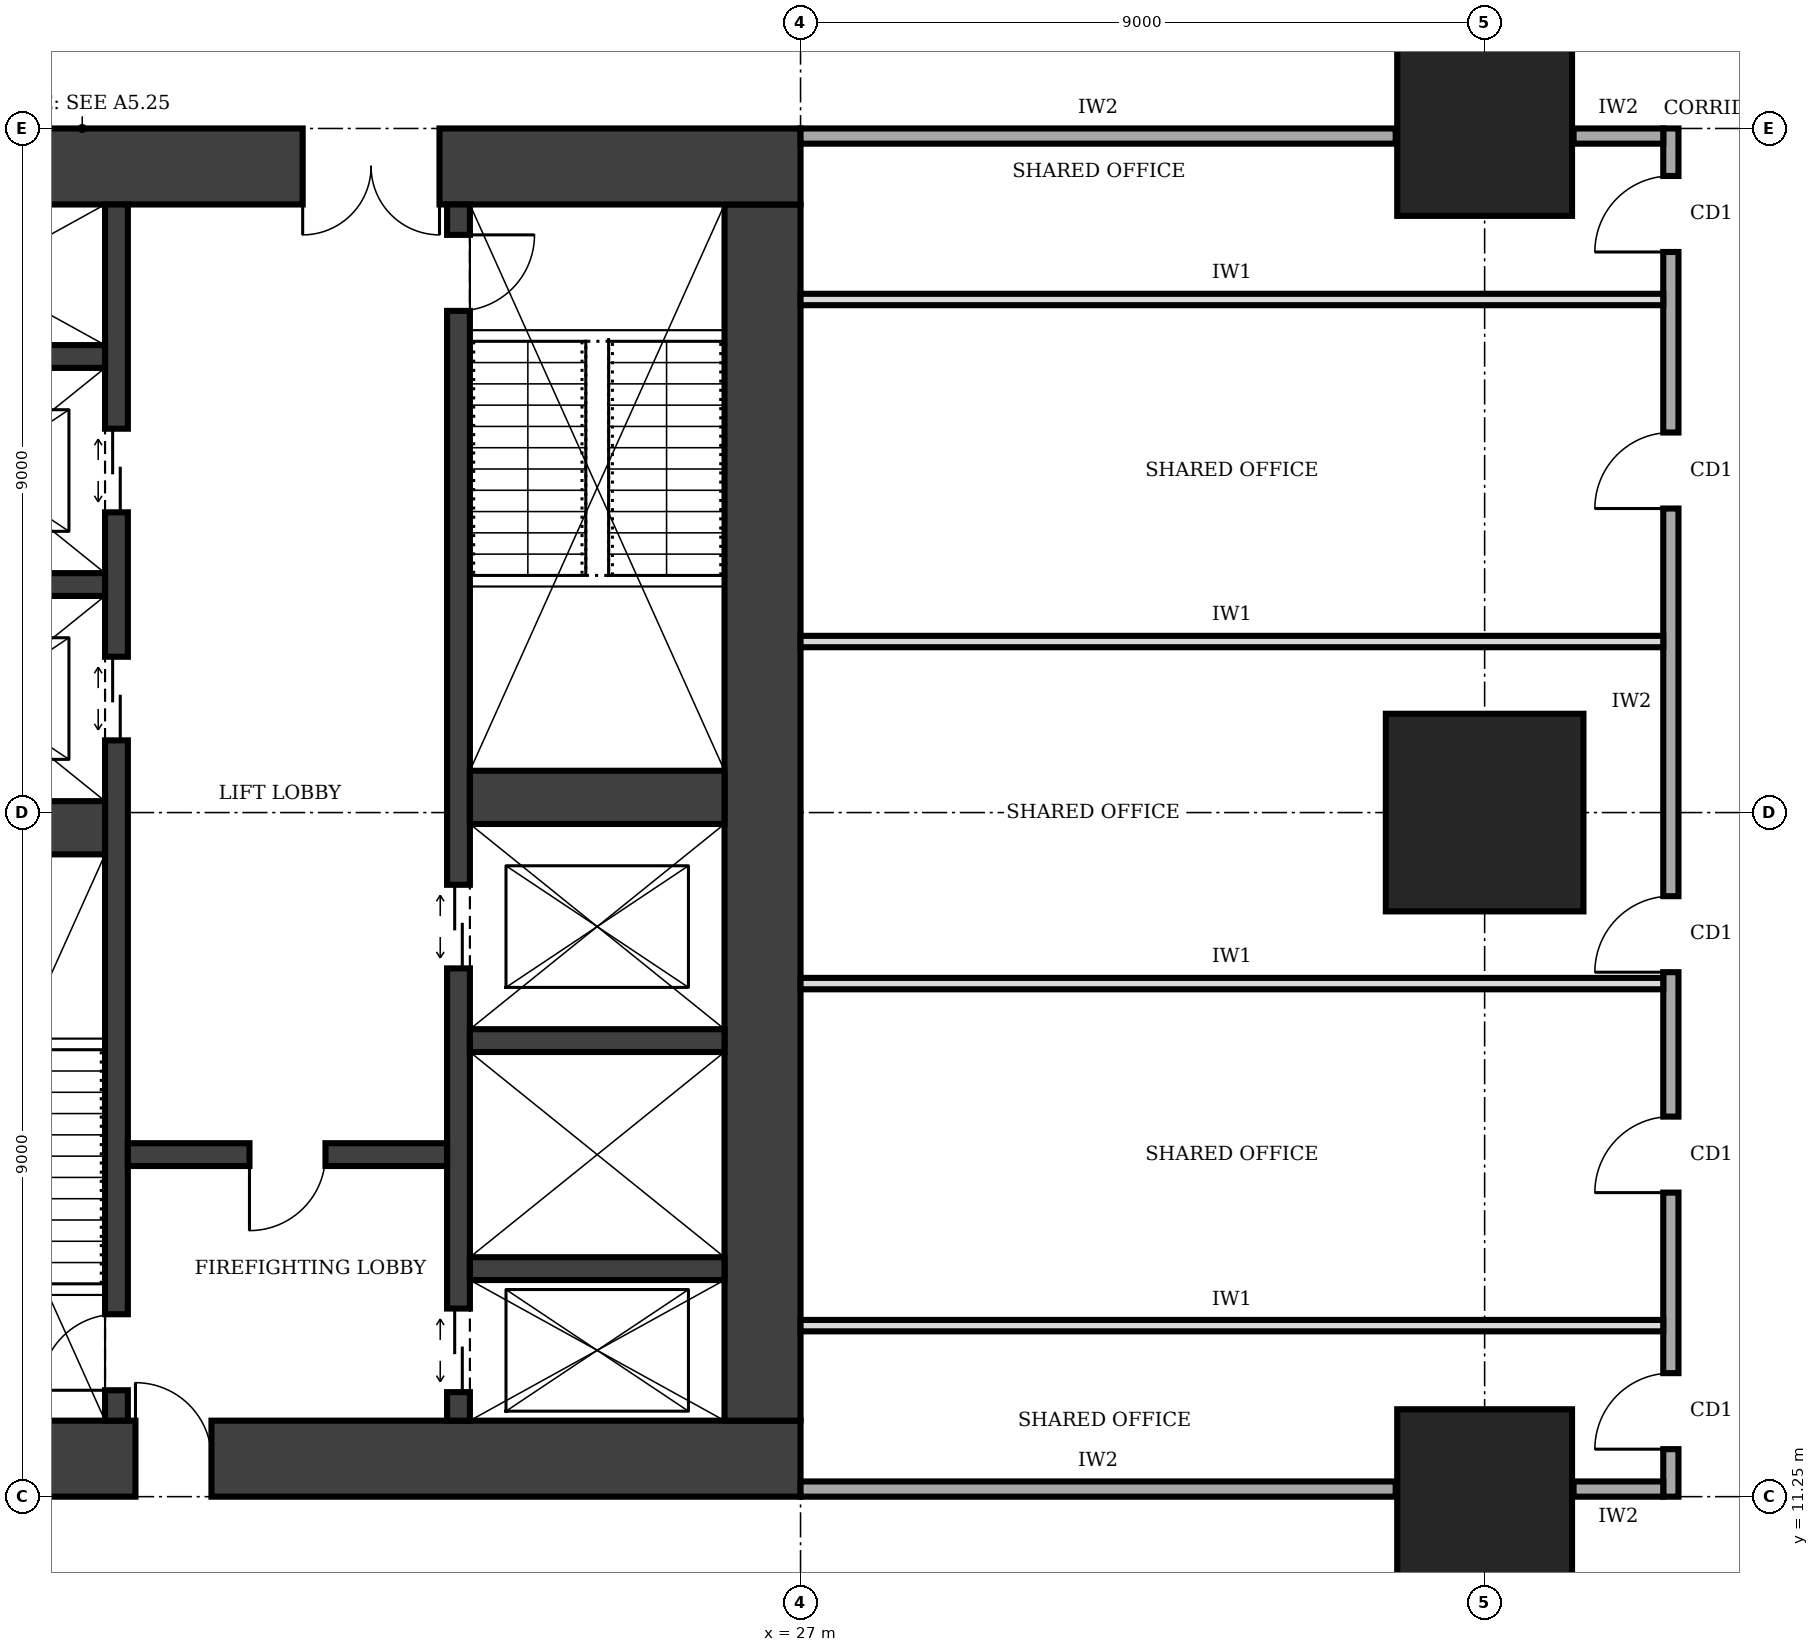
"""IFC4 building model, lengths in metres.
Left out: names, types, materials, properties, quantities, classifications, styles, units other than length and angle.
Written with IfcOpenShell. Run it as: python <this file> out.ifc"""

import sys

from ifc_helpers import new_model, si_unit, direction, frame, frame_2d, origin, origin_2d, place, context, subcontext, project, spatial, rectangle, extrude, element, fill, save


model = new_model("IFC4")
c1 = context("Model", 3, precision=1e-05, world=origin(), true_north=direction((0.0, 1.0)))
c2 = subcontext(c1, "Body", "Model", "MODEL_VIEW")
j1 = project(units=[si_unit("LENGTHUNIT", "METRE"), si_unit("PLANEANGLEUNIT", "RADIAN")], contexts=[c1])
p1 = place(None, origin())
s1 = spatial("IfcSite", under=j1, at=p1, CompositionType="ELEMENT")
p2 = place(p1, origin())
s2 = spatial("IfcBuilding", under=s1, at=p2, CompositionType="ELEMENT")
p3 = place(p2, frame((0.0, 0.0, 85.0)))
s3 = spatial("IfcBuildingStorey", under=s2, at=p3, CompositionType="ELEMENT", Elevation=85.0)
p4 = place(p3, frame((13.5, 11.75, 0.0), z_axis=(0.0, 0.0, 1.0), x_axis=(1.0, 0.0, 0.0)))
e1 = element("IfcWall", 1, at=p4, inside=s3, PredefinedType="SHEAR", context=c2, shape_type="SweptSolid", body=[
    extrude(rectangle(XDim=13.5, YDim=1.0, at=frame_2d((6.75, 0.0))), origin(), (0.0, 0.0, 1.0), 4.0),
])
p5 = place(p4, frame((4.75, 0.0, 0.0)))
e2 = element("IfcOpeningElement", 2, at=p5, cuts=e1, PredefinedType="OPENING", context=c2, shape_type="SweptSolid", body=[
    extrude(rectangle(XDim=1.0, YDim=2.1, at=frame_2d((0.5, 1.05))), frame((0.0, 0.51, 0.0), z_axis=(0.0, -1.0, 0.0), x_axis=(1.0, 0.0, 0.0)), (0.0, 0.0, 1.0), 1.02),
])
p6 = place(p3, frame((26.5, 12.25, 0.0), z_axis=(0.0, 0.0, 1.0), x_axis=(0.0, 1.0, 0.0)))
e3 = element("IfcWall", 3, at=p6, inside=s3, PredefinedType="SHEAR", context=c2, shape_type="SweptSolid", body=[
    extrude(rectangle(XDim=16.0, YDim=1.0, at=frame_2d((8.0, 0.0))), origin(), (0.0, 0.0, 1.0), 4.0),
])
p7 = place(p3, frame((27.0, 28.75, 0.0), z_axis=(0.0, 0.0, 1.0), x_axis=(-1.0, 0.0, 0.0)))
e4 = element("IfcWall", 4, at=p7, inside=s3, PredefinedType="SHEAR", context=c2, shape_type="SweptSolid", body=[
    extrude(rectangle(XDim=13.5, YDim=1.0, at=frame_2d((6.75, 0.0))), origin(), (0.0, 0.0, 1.0), 4.0),
])
p8 = place(p7, frame((4.75, 0.0, 0.0)))
e5 = element("IfcOpeningElement", 5, at=p8, cuts=e4, PredefinedType="OPENING", context=c2, shape_type="SweptSolid", body=[
    extrude(rectangle(XDim=1.8, YDim=2.1, at=frame_2d((0.9, 1.05))), frame((0.0, 0.51, 0.0), z_axis=(0.0, -1.0, 0.0), x_axis=(1.0, 0.0, 0.0)), (0.0, 0.0, 1.0), 1.02),
])
p9 = place(p3, frame((18.0, 12.25, 0.0), z_axis=(0.0, 0.0, 1.0), x_axis=(0.0, 1.0, 0.0)))
e6 = element("IfcWall", 6, at=p9, inside=s3, PredefinedType="SHEAR", context=c2, shape_type="SweptSolid", body=[
    extrude(rectangle(XDim=16.0, YDim=0.3, at=frame_2d((8.0, 0.0))), origin(), (0.0, 0.0, 1.0), 4.0),
])
p10 = place(p9, frame((0.4, 0.0, 0.0)))
e7 = element("IfcOpeningElement", 7, at=p10, cuts=e6, PredefinedType="OPENING", context=c2, shape_type="SweptSolid", body=[
    extrude(rectangle(XDim=1.0, YDim=2.1, at=frame_2d((0.5, 1.05))), frame((0.0, 0.16, 0.0), z_axis=(0.0, -1.0, 0.0), x_axis=(1.0, 0.0, 0.0)), (0.0, 0.0, 1.0), 0.32),
])
p11 = place(p9, frame((8.95, 0.0, 0.0)))
e8 = element("IfcOpeningElement", 8, at=p11, cuts=e6, PredefinedType="OPENING", context=c2, shape_type="SweptSolid", body=[
    extrude(rectangle(XDim=1.1, YDim=2.1, at=frame_2d((0.55, 1.05))), frame((0.0, 0.16, 0.0), z_axis=(0.0, -1.0, 0.0), x_axis=(1.0, 0.0, 0.0)), (0.0, 0.0, 1.0), 0.32),
])
p12 = place(p9, frame((11.95, 0.0, 0.0)))
e9 = element("IfcOpeningElement", 9, at=p12, cuts=e6, PredefinedType="OPENING", context=c2, shape_type="SweptSolid", body=[
    extrude(rectangle(XDim=1.1, YDim=2.1, at=frame_2d((0.55, 1.05))), frame((0.0, 0.16, 0.0), z_axis=(0.0, -1.0, 0.0), x_axis=(1.0, 0.0, 0.0)), (0.0, 0.0, 1.0), 0.32),
])
p13 = place(p3, frame((22.5, 12.25, 0.0), z_axis=(0.0, 0.0, 1.0), x_axis=(0.0, 1.0, 0.0)))
e10 = element("IfcWall", 10, at=p13, inside=s3, PredefinedType="SHEAR", context=c2, shape_type="SweptSolid", body=[
    extrude(rectangle(XDim=16.0, YDim=0.3, at=frame_2d((8.0, 0.0))), origin(), (0.0, 0.0, 1.0), 4.0),
])
p14 = place(p13, frame((14.6, 0.0, 0.0)))
e11 = element("IfcOpeningElement", 11, at=p14, cuts=e10, PredefinedType="OPENING", context=c2, shape_type="SweptSolid", body=[
    extrude(rectangle(XDim=1.0, YDim=2.1, at=frame_2d((0.5, 1.05))), frame((0.0, 0.16, 0.0), z_axis=(0.0, -1.0, 0.0), x_axis=(1.0, 0.0, 0.0)), (0.0, 0.0, 1.0), 0.32),
])
p15 = place(p13, frame((0.375, 0.0, 0.0)))
e12 = element("IfcOpeningElement", 12, at=p15, cuts=e10, PredefinedType="OPENING", context=c2, shape_type="SweptSolid", body=[
    extrude(rectangle(XDim=1.1, YDim=2.1, at=frame_2d((0.55, 1.05))), frame((0.0, 0.16, 0.0), z_axis=(0.0, -1.0, 0.0), x_axis=(1.0, 0.0, 0.0)), (0.0, 0.0, 1.0), 0.32),
])
p16 = place(p13, frame((5.95, 0.0, 0.0)))
e13 = element("IfcOpeningElement", 13, at=p16, cuts=e10, PredefinedType="OPENING", context=c2, shape_type="SweptSolid", body=[
    extrude(rectangle(XDim=1.1, YDim=2.1, at=frame_2d((0.55, 1.05))), frame((0.0, 0.16, 0.0), z_axis=(0.0, -1.0, 0.0), x_axis=(1.0, 0.0, 0.0)), (0.0, 0.0, 1.0), 0.32),
])
p17 = place(p3, frame((14.5, 20.05, 0.0), z_axis=(0.0, 0.0, 1.0), x_axis=(1.0, 0.0, 0.0)))
e14 = element("IfcWall", 14, at=p17, inside=s3, PredefinedType="SHEAR", context=c2, shape_type="SweptSolid", body=[
    extrude(rectangle(XDim=3.35, YDim=0.7, at=frame_2d((1.675, 0.0))), origin(), (0.0, 0.0, 1.0), 4.0),
])
p18 = place(p3, frame((18.15, 15.75, 0.0), z_axis=(0.0, 0.0, 1.0), x_axis=(1.0, 0.0, 0.0)))
e15 = element("IfcWall", 15, at=p18, inside=s3, PredefinedType="SHEAR", context=c2, shape_type="SweptSolid", body=[
    extrude(rectangle(XDim=4.2, YDim=0.3, at=frame_2d((2.1, 0.0))), origin(), (0.0, 0.0, 1.0), 4.0),
])
p19 = place(p18, frame((1.6, 0.0, 0.0)))
e16 = element("IfcOpeningElement", 16, at=p19, cuts=e15, PredefinedType="OPENING", context=c2, shape_type="SweptSolid", body=[
    extrude(rectangle(XDim=1.0, YDim=2.1, at=frame_2d((0.5, 1.05))), frame((0.0, 0.16, 0.0), z_axis=(0.0, -1.0, 0.0), x_axis=(1.0, 0.0, 0.0)), (0.0, 0.0, 1.0), 0.32),
])
for number, where, z_axis, x_axis in (
    (17, (22.65, 14.25, 0.0), (0.0, 0.0, 1.0), (1.0, 0.0, 0.0)),
    (18, (22.65, 17.25, 0.0), (0.0, 0.0, 1.0), (1.0, 0.0, 0.0)),
):
    element("IfcWall", number, at=place(p3, frame(where, z_axis=z_axis, x_axis=x_axis)), inside=s3, PredefinedType="SHEAR", context=c2, shape_type="SweptSolid", body=[
        extrude(rectangle(XDim=3.35, YDim=0.3, at=frame_2d((1.675, 0.0))), origin(), (0.0, 0.0, 1.0), 4.0),
    ])
p20 = place(p3, frame((22.65, 20.45, 0.0), z_axis=(0.0, 0.0, 1.0), x_axis=(1.0, 0.0, 0.0)))
e19 = element("IfcWall", 19, at=p20, inside=s3, PredefinedType="SHEAR", context=c2, shape_type="SweptSolid", body=[
    extrude(rectangle(XDim=3.35, YDim=0.7, at=frame_2d((1.675, 0.0))), origin(), (0.0, 0.0, 1.0), 4.0),
])
for number, where, z_axis, x_axis in (
    (20, (14.5, 23.25, 0.0), (0.0, 0.0, 1.0), (1.0, 0.0, 0.0)),
    (21, (14.5, 26.25, 0.0), (0.0, 0.0, 1.0), (1.0, 0.0, 0.0)),
):
    element("IfcWall", number, at=place(p3, frame(where, z_axis=z_axis, x_axis=x_axis)), inside=s3, PredefinedType="SHEAR", context=c2, shape_type="SweptSolid", body=[
        extrude(rectangle(XDim=3.35, YDim=0.3, at=frame_2d((1.675, 0.0))), origin(), (0.0, 0.0, 1.0), 4.0),
    ])
p21 = place(p3, frame((36.0, 11.25, 0.0), z_axis=(0.0, 0.0, 1.0), x_axis=(1.0, 0.0, 0.0)))
e22 = element("IfcColumn", 22, at=p21, inside=s3, PredefinedType="COLUMN", context=c2, shape_type="SweptSolid", body=[
    extrude(rectangle(XDim=2.3, YDim=2.3, at=origin_2d()), origin(), (0.0, 0.0, 1.0), 4.0),
])
p22 = place(p3, frame((36.0, 20.25, 0.0), z_axis=(0.0, 0.0, 1.0), x_axis=(1.0, 0.0, 0.0)))
e23 = element("IfcColumn", 23, at=p22, inside=s3, PredefinedType="COLUMN", context=c2, shape_type="SweptSolid", body=[
    extrude(rectangle(XDim=2.6, YDim=2.6, at=origin_2d()), origin(), (0.0, 0.0, 1.0), 4.0),
])
p23 = place(p3, frame((36.0, 29.25, 0.0), z_axis=(0.0, 0.0, 1.0), x_axis=(1.0, 0.0, 0.0)))
e24 = element("IfcColumn", 24, at=p23, inside=s3, PredefinedType="COLUMN", context=c2, shape_type="SweptSolid", body=[
    extrude(rectangle(XDim=2.3, YDim=2.3, at=origin_2d()), origin(), (0.0, 0.0, 1.0), 4.0),
])
p24 = place(p3, frame((38.45, 11.25, 0.0), z_axis=(0.0, 0.0, 1.0), x_axis=(0.0, 1.0, 0.0)))
e25 = element("IfcWall", 25, at=p24, inside=s3, PredefinedType="SOLIDWALL", context=c2, shape_type="SweptSolid", body=[
    extrude(rectangle(XDim=18.0, YDim=0.2, at=frame_2d((9.0, 0.0))), origin(), (0.0, 0.0, 1.0), 3.75),
])
p25 = place(p24, frame((0.625, 0.0, 0.0)))
e26 = element("IfcOpeningElement", 26, at=p25, cuts=e25, PredefinedType="OPENING", context=c2, shape_type="SweptSolid", body=[
    extrude(rectangle(XDim=1.0, YDim=2.1, at=frame_2d((0.5, 1.05))), frame((0.0, 0.11, 0.0), z_axis=(0.0, -1.0, 0.0), x_axis=(1.0, 0.0, 0.0)), (0.0, 0.0, 1.0), 0.22),
])
p26 = place(p24, frame((4.0, 0.0, 0.0)))
e27 = element("IfcOpeningElement", 27, at=p26, cuts=e25, PredefinedType="OPENING", context=c2, shape_type="SweptSolid", body=[
    extrude(rectangle(XDim=1.0, YDim=2.1, at=frame_2d((0.5, 1.05))), frame((0.0, 0.11, 0.0), z_axis=(0.0, -1.0, 0.0), x_axis=(1.0, 0.0, 0.0)), (0.0, 0.0, 1.0), 0.22),
])
p27 = place(p24, frame((6.9, 0.0, 0.0)))
e28 = element("IfcOpeningElement", 28, at=p27, cuts=e25, PredefinedType="OPENING", context=c2, shape_type="SweptSolid", body=[
    extrude(rectangle(XDim=1.0, YDim=2.1, at=frame_2d((0.5, 1.05))), frame((0.0, 0.11, 0.0), z_axis=(0.0, -1.0, 0.0), x_axis=(1.0, 0.0, 0.0)), (0.0, 0.0, 1.0), 0.22),
])
p28 = place(p24, frame((13.0, 0.0, 0.0)))
e29 = element("IfcOpeningElement", 29, at=p28, cuts=e25, PredefinedType="OPENING", context=c2, shape_type="SweptSolid", body=[
    extrude(rectangle(XDim=1.0, YDim=2.1, at=frame_2d((0.5, 1.05))), frame((0.0, 0.11, 0.0), z_axis=(0.0, -1.0, 0.0), x_axis=(1.0, 0.0, 0.0)), (0.0, 0.0, 1.0), 0.22),
])
p29 = place(p24, frame((16.375, 0.0, 0.0)))
e30 = element("IfcOpeningElement", 30, at=p29, cuts=e25, PredefinedType="OPENING", context=c2, shape_type="SweptSolid", body=[
    extrude(rectangle(XDim=1.0, YDim=2.1, at=frame_2d((0.5, 1.05))), frame((0.0, 0.11, 0.0), z_axis=(0.0, -1.0, 0.0), x_axis=(1.0, 0.0, 0.0)), (0.0, 0.0, 1.0), 0.22),
])
p30 = place(p3, frame((27.0, 11.35, 0.0), z_axis=(0.0, 0.0, 1.0), x_axis=(1.0, 0.0, 0.0)))
e31 = element("IfcWall", 31, at=p30, inside=s3, PredefinedType="SOLIDWALL", context=c2, shape_type="SweptSolid", body=[
    extrude(rectangle(XDim=7.83, YDim=0.2, at=frame_2d((3.915, 0.0))), origin(), (0.0, 0.0, 1.0), 2.85),
])
p31 = place(p3, frame((37.17, 11.35, 0.0), z_axis=(0.0, 0.0, 1.0), x_axis=(1.0, 0.0, 0.0)))
e32 = element("IfcWall", 32, at=p31, inside=s3, PredefinedType="SOLIDWALL", context=c2, shape_type="SweptSolid", body=[
    extrude(rectangle(XDim=1.18, YDim=0.2, at=frame_2d((0.59, 0.0))), origin(), (0.0, 0.0, 1.0), 2.85),
])
p32 = place(p3, frame((27.0, 29.15, 0.0), z_axis=(0.0, 0.0, 1.0), x_axis=(1.0, 0.0, 0.0)))
e33 = element("IfcWall", 33, at=p32, inside=s3, PredefinedType="SOLIDWALL", context=c2, shape_type="SweptSolid", body=[
    extrude(rectangle(XDim=7.83, YDim=0.2, at=frame_2d((3.915, 0.0))), origin(), (0.0, 0.0, 1.0), 2.85),
])
p33 = place(p3, frame((37.17, 29.15, 0.0), z_axis=(0.0, 0.0, 1.0), x_axis=(1.0, 0.0, 0.0)))
e34 = element("IfcWall", 34, at=p33, inside=s3, PredefinedType="SOLIDWALL", context=c2, shape_type="SweptSolid", body=[
    extrude(rectangle(XDim=1.18, YDim=0.2, at=frame_2d((0.59, 0.0))), origin(), (0.0, 0.0, 1.0), 2.85),
])
for number, where, z_axis, x_axis in (
    (35, (27.0, 13.5, 0.0), (0.0, 0.0, 1.0), (1.0, 0.0, 0.0)),
    (36, (27.0, 18.0, 0.0), (0.0, 0.0, 1.0), (1.0, 0.0, 0.0)),
    (37, (27.0, 22.5, 0.0), (0.0, 0.0, 1.0), (1.0, 0.0, 0.0)),
    (38, (27.0, 27.0, 0.0), (0.0, 0.0, 1.0), (1.0, 0.0, 0.0)),
):
    element("IfcWall", number, at=place(p3, frame(where, z_axis=z_axis, x_axis=x_axis)), inside=s3, PredefinedType="PARTITIONING", context=c2, shape_type="SweptSolid", body=[
        extrude(rectangle(XDim=11.35, YDim=0.15, at=frame_2d((5.675, 0.0))), origin(), (0.0, 0.0, 1.0), 3.75),
    ])
p34 = place(p5, origin())
e39 = element("IfcDoor", 39, at=p34, inside=s3, OperationType="SINGLE_SWING_LEFT", PredefinedType="DOOR", context=c2, shape_type="SweptSolid", body=[
    extrude(rectangle(XDim=1.0, YDim=2.1, at=frame_2d((0.5, 1.05))), frame((0.0, 0.025, 0.0), z_axis=(0.0, -1.0, 0.0), x_axis=(1.0, 0.0, 0.0)), (0.0, 0.0, 1.0), 0.05),
])
fill(e2, e39)
p35 = place(p8, origin())
e40 = element("IfcDoor", 40, at=p35, inside=s3, OperationType="DOUBLE_DOOR_SINGLE_SWING", PredefinedType="DOOR", context=c2, shape_type="SweptSolid", body=[
    extrude(rectangle(XDim=1.8, YDim=2.1, at=frame_2d((0.9, 1.05))), frame((0.0, 0.025, 0.0), z_axis=(0.0, -1.0, 0.0), x_axis=(1.0, 0.0, 0.0)), (0.0, 0.0, 1.0), 0.05),
])
fill(e5, e40)
p36 = place(p19, frame((1.0, 0.0, 0.0), z_axis=(0.0, 0.0, 1.0), x_axis=(-1.0, 0.0, 0.0)))
e41 = element("IfcDoor", 41, at=p36, inside=s3, OperationType="SINGLE_SWING_RIGHT", PredefinedType="DOOR", context=c2, shape_type="SweptSolid", body=[
    extrude(rectangle(XDim=1.0, YDim=2.1, at=frame_2d((0.5, 1.05))), frame((0.0, 0.025, 0.0), z_axis=(0.0, -1.0, 0.0), x_axis=(1.0, 0.0, 0.0)), (0.0, 0.0, 1.0), 0.05),
])
fill(e16, e41)
p37 = place(p10, origin())
e42 = element("IfcDoor", 42, at=p37, inside=s3, OperationType="SINGLE_SWING_LEFT", PredefinedType="DOOR", context=c2, shape_type="SweptSolid", body=[
    extrude(rectangle(XDim=1.0, YDim=2.1, at=frame_2d((0.5, 1.05))), frame((0.0, 0.025, 0.0), z_axis=(0.0, -1.0, 0.0), x_axis=(1.0, 0.0, 0.0)), (0.0, 0.0, 1.0), 0.05),
])
fill(e7, e42)
p38 = place(p14, frame((1.0, 0.0, 0.0), z_axis=(0.0, 0.0, 1.0), x_axis=(-1.0, 0.0, 0.0)))
e43 = element("IfcDoor", 43, at=p38, inside=s3, OperationType="SINGLE_SWING_LEFT", PredefinedType="DOOR", context=c2, shape_type="SweptSolid", body=[
    extrude(rectangle(XDim=1.0, YDim=2.1, at=frame_2d((0.5, 1.05))), frame((0.0, 0.025, 0.0), z_axis=(0.0, -1.0, 0.0), x_axis=(1.0, 0.0, 0.0)), (0.0, 0.0, 1.0), 0.05),
])
fill(e11, e43)
p39 = place(p15, origin())
e44 = element("IfcDoor", 44, at=p39, inside=s3, OperationType="DOUBLE_DOOR_SLIDING", PredefinedType="DOOR", context=c2, shape_type="SweptSolid", body=[
    extrude(rectangle(XDim=1.1, YDim=2.1, at=frame_2d((0.55, 1.05))), frame((0.0, 0.025, 0.0), z_axis=(0.0, -1.0, 0.0), x_axis=(1.0, 0.0, 0.0)), (0.0, 0.0, 1.0), 0.05),
])
fill(e12, e44)
p40 = place(p11, origin())
e45 = element("IfcDoor", 45, at=p40, inside=s3, OperationType="DOUBLE_DOOR_SLIDING", PredefinedType="DOOR", context=c2, shape_type="SweptSolid", body=[
    extrude(rectangle(XDim=1.1, YDim=2.1, at=frame_2d((0.55, 1.05))), frame((0.0, 0.025, 0.0), z_axis=(0.0, -1.0, 0.0), x_axis=(1.0, 0.0, 0.0)), (0.0, 0.0, 1.0), 0.05),
])
fill(e8, e45)
p41 = place(p12, origin())
e46 = element("IfcDoor", 46, at=p41, inside=s3, OperationType="DOUBLE_DOOR_SLIDING", PredefinedType="DOOR", context=c2, shape_type="SweptSolid", body=[
    extrude(rectangle(XDim=1.1, YDim=2.1, at=frame_2d((0.55, 1.05))), frame((0.0, 0.025, 0.0), z_axis=(0.0, -1.0, 0.0), x_axis=(1.0, 0.0, 0.0)), (0.0, 0.0, 1.0), 0.05),
])
fill(e9, e46)
p42 = place(p16, origin())
e47 = element("IfcDoor", 47, at=p42, inside=s3, OperationType="DOUBLE_DOOR_SLIDING", PredefinedType="DOOR", context=c2, shape_type="SweptSolid", body=[
    extrude(rectangle(XDim=1.1, YDim=2.1, at=frame_2d((0.55, 1.05))), frame((0.0, 0.025, 0.0), z_axis=(0.0, -1.0, 0.0), x_axis=(1.0, 0.0, 0.0)), (0.0, 0.0, 1.0), 0.05),
])
fill(e13, e47)
p43 = place(p25, origin())
e48 = element("IfcDoor", 48, at=p43, inside=s3, OperationType="SINGLE_SWING_LEFT", PredefinedType="DOOR", context=c2, shape_type="SweptSolid", body=[
    extrude(rectangle(XDim=1.0, YDim=2.1, at=frame_2d((0.5, 1.05))), frame((0.0, 0.025, 0.0), z_axis=(0.0, -1.0, 0.0), x_axis=(1.0, 0.0, 0.0)), (0.0, 0.0, 1.0), 0.05),
])
fill(e26, e48)
p44 = place(p26, origin())
e49 = element("IfcDoor", 49, at=p44, inside=s3, OperationType="SINGLE_SWING_LEFT", PredefinedType="DOOR", context=c2, shape_type="SweptSolid", body=[
    extrude(rectangle(XDim=1.0, YDim=2.1, at=frame_2d((0.5, 1.05))), frame((0.0, 0.025, 0.0), z_axis=(0.0, -1.0, 0.0), x_axis=(1.0, 0.0, 0.0)), (0.0, 0.0, 1.0), 0.05),
])
fill(e27, e49)
p45 = place(p27, origin())
e50 = element("IfcDoor", 50, at=p45, inside=s3, OperationType="SINGLE_SWING_LEFT", PredefinedType="DOOR", context=c2, shape_type="SweptSolid", body=[
    extrude(rectangle(XDim=1.0, YDim=2.1, at=frame_2d((0.5, 1.05))), frame((0.0, 0.025, 0.0), z_axis=(0.0, -1.0, 0.0), x_axis=(1.0, 0.0, 0.0)), (0.0, 0.0, 1.0), 0.05),
])
fill(e28, e50)
p46 = place(p28, origin())
e51 = element("IfcDoor", 51, at=p46, inside=s3, OperationType="SINGLE_SWING_LEFT", PredefinedType="DOOR", context=c2, shape_type="SweptSolid", body=[
    extrude(rectangle(XDim=1.0, YDim=2.1, at=frame_2d((0.5, 1.05))), frame((0.0, 0.025, 0.0), z_axis=(0.0, -1.0, 0.0), x_axis=(1.0, 0.0, 0.0)), (0.0, 0.0, 1.0), 0.05),
])
fill(e29, e51)
p47 = place(p29, origin())
e52 = element("IfcDoor", 52, at=p47, inside=s3, OperationType="SINGLE_SWING_LEFT", PredefinedType="DOOR", context=c2, shape_type="SweptSolid", body=[
    extrude(rectangle(XDim=1.0, YDim=2.1, at=frame_2d((0.5, 1.05))), frame((0.0, 0.025, 0.0), z_axis=(0.0, -1.0, 0.0), x_axis=(1.0, 0.0, 0.0)), (0.0, 0.0, 1.0), 0.05),
])
fill(e30, e52)
save(model, sys.argv[1])
